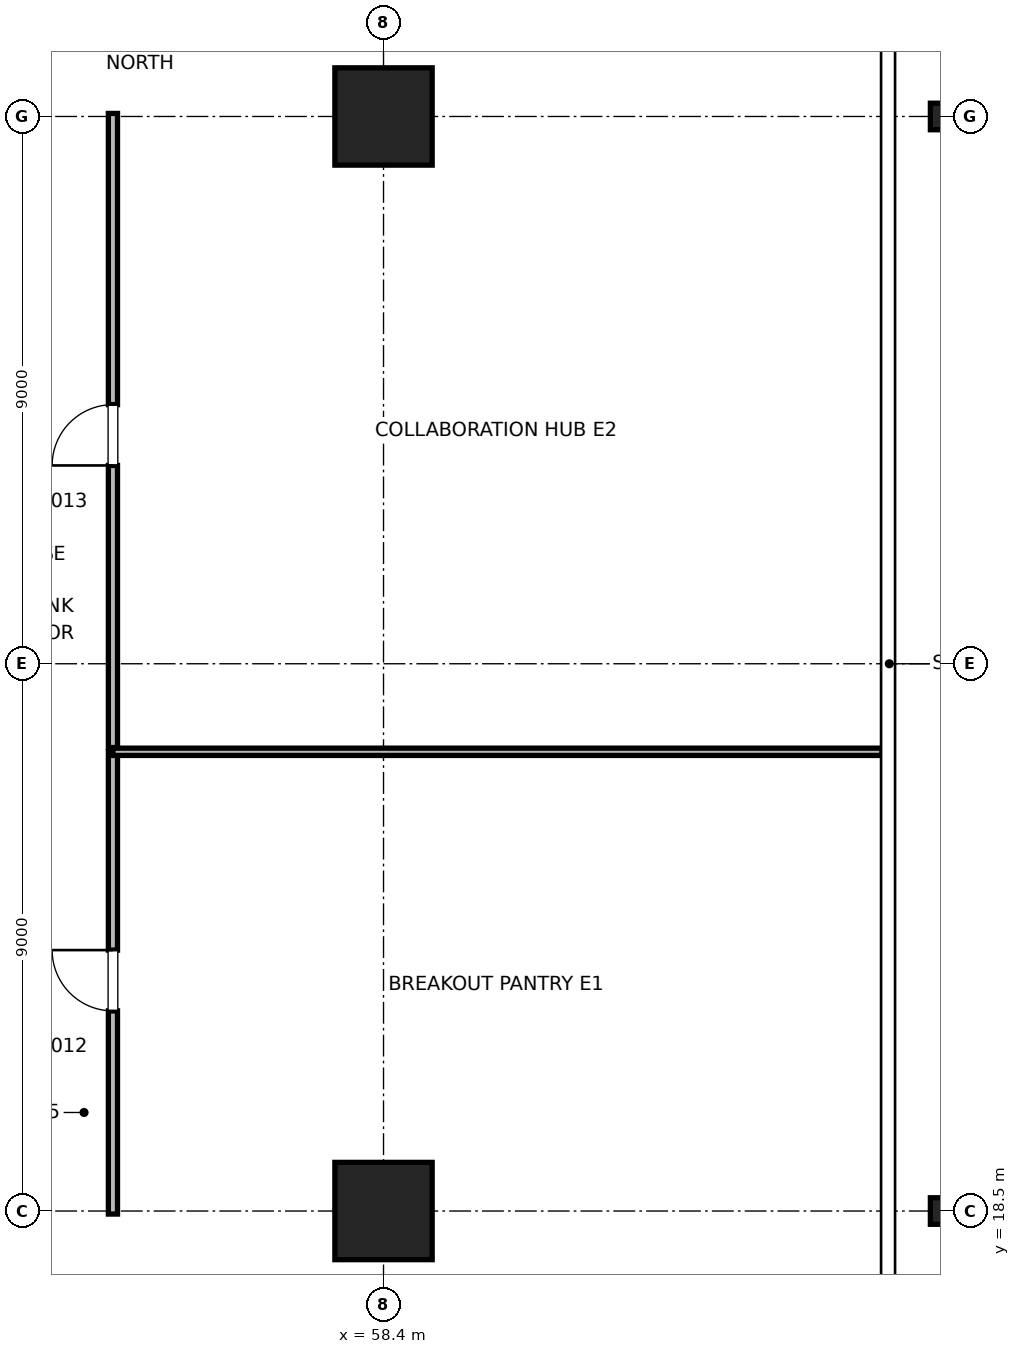
"""IFC4 building model, lengths in metres.
Left out: names, types, materials, properties, quantities, classifications, styles, units other than length and angle.
Written with IfcOpenShell. Run it as: python <this file> out.ifc"""

import sys

from ifc_helpers import new_model, si_unit, direction, frame, frame_2d, origin, origin_2d, place, context, subcontext, project, spatial, rectangle, i_section, extrude, element, fill, save


model = new_model("IFC4")
c1 = context("Model", 3, precision=1e-05, world=origin(), true_north=direction((0.0, 1.0)))
c2 = subcontext(c1, "Body", "Model", "MODEL_VIEW")
j1 = project(units=[si_unit("LENGTHUNIT", "METRE"), si_unit("PLANEANGLEUNIT", "RADIAN")], contexts=[c1])
p1 = place(None, origin())
s1 = spatial("IfcSite", under=j1, at=p1, CompositionType="ELEMENT")
p2 = place(p1, origin())
s2 = spatial("IfcBuilding", under=s1, at=p2, CompositionType="ELEMENT")
p3 = place(p2, frame((0.0, 0.0, 164.4)))
s3 = spatial("IfcBuildingStorey", under=s2, at=p3, CompositionType="ELEMENT", Elevation=164.4)
for number, where, z_axis, x_axis in (
    (1, (58.4, 18.5, 0.0), (0.0, 0.0, 1.0), (1.0, 0.0, 0.0)),
    (2, (58.4, 36.5, 0.0), (0.0, 0.0, 1.0), (1.0, 0.0, 0.0)),
):
    element("IfcColumn", number, at=place(p3, frame(where, z_axis=z_axis, x_axis=x_axis)), inside=s3, PredefinedType="COLUMN", context=c2, shape_type="SweptSolid", body=[
        extrude(rectangle(XDim=1.6, YDim=1.6, at=origin_2d()), origin(), (0.0, 0.0, 1.0), 4.0),
    ])
for number, where, z_axis, x_axis in (
    (3, (67.6, 18.5, 0.0), (0.0, 0.0, 1.0), (1.0, 0.0, 0.0)),
    (4, (67.6, 36.5, 0.0), (0.0, 0.0, 1.0), (1.0, 0.0, 0.0)),
):
    element("IfcColumn", number, at=place(p3, frame(where, z_axis=z_axis, x_axis=x_axis)), inside=s3, PredefinedType="COLUMN", context=c2, shape_type="SweptSolid", body=[
        extrude(i_section(OverallWidth=0.412, OverallDepth=0.437, WebThickness=0.036, FlangeThickness=0.058, FilletRadius=0.015, at=origin_2d()), origin(), (0.0, 0.0, 1.0), 4.0),
    ])
p4 = place(p3, frame((53.95, 18.45, 0.0), z_axis=(0.0, 0.0, 1.0), x_axis=(0.0, 1.0, 0.0)))
e5 = element("IfcWall", 5, at=p4, inside=s3, PredefinedType="PARTITIONING", context=c2, shape_type="SweptSolid", body=[
    extrude(rectangle(XDim=7.602, YDim=0.15, at=frame_2d((3.801, 0.0))), origin(), (0.0, 0.0, 1.0), 2.85),
])
p5 = place(p4, frame((3.341, 0.0, 0.0)))
e6 = element("IfcOpeningElement", 6, at=p5, cuts=e5, PredefinedType="OPENING", context=c2, shape_type="SweptSolid", body=[
    extrude(rectangle(XDim=1.0, YDim=2.15, at=frame_2d((0.5, 1.075))), frame((0.0, 0.075, 0.0), z_axis=(0.0, -1.0, 0.0), x_axis=(1.0, 0.0, 0.0)), (0.0, 0.0, 1.0), 0.15),
])
p6 = place(p3, frame((53.95, 26.052, 0.0), z_axis=(0.0, 0.0, 1.0), x_axis=(1.0, 0.0, 0.0)))
e7 = element("IfcWall", 7, at=p6, inside=s3, PredefinedType="PARTITIONING", context=c2, shape_type="SweptSolid", body=[
    extrude(rectangle(XDim=12.648, YDim=0.12, at=frame_2d((6.324, 0.0))), origin(), (0.0, 0.0, 1.0), 2.85),
])
p7 = place(p3, frame((53.95, 26.122, 0.0), z_axis=(0.0, 0.0, 1.0), x_axis=(0.0, 1.0, 0.0)))
e8 = element("IfcWall", 8, at=p7, inside=s3, PredefinedType="PARTITIONING", context=c2, shape_type="SweptSolid", body=[
    extrude(rectangle(XDim=10.428, YDim=0.15, at=frame_2d((5.214, 0.0))), origin(), (0.0, 0.0, 1.0), 2.85),
])
p8 = place(p7, frame((4.639, 0.0, 0.0)))
e9 = element("IfcOpeningElement", 9, at=p8, cuts=e8, PredefinedType="OPENING", context=c2, shape_type="SweptSolid", body=[
    extrude(rectangle(XDim=1.0, YDim=2.15, at=frame_2d((0.5, 1.075))), frame((0.0, 0.075, 0.0), z_axis=(0.0, -1.0, 0.0), x_axis=(1.0, 0.0, 0.0)), (0.0, 0.0, 1.0), 0.15),
])
p9 = place(p5, origin())
e10 = element("IfcDoor", 10, at=p9, inside=s3, OperationType="SINGLE_SWING_RIGHT", PredefinedType="DOOR", context=c2, shape_type="SweptSolid", body=[
    extrude(rectangle(XDim=1.0, YDim=2.15, at=frame_2d((0.5, 1.075))), frame((0.0, 0.025, 0.0), z_axis=(0.0, -1.0, 0.0), x_axis=(1.0, 0.0, 0.0)), (0.0, 0.0, 1.0), 0.05),
])
fill(e6, e10)
p10 = place(p8, origin())
e11 = element("IfcDoor", 11, at=p10, inside=s3, OperationType="SINGLE_SWING_LEFT", PredefinedType="DOOR", context=c2, shape_type="SweptSolid", body=[
    extrude(rectangle(XDim=1.0, YDim=2.15, at=frame_2d((0.5, 1.075))), frame((0.0, 0.025, 0.0), z_axis=(0.0, -1.0, 0.0), x_axis=(1.0, 0.0, 0.0)), (0.0, 0.0, 1.0), 0.05),
])
fill(e9, e11)
save(model, sys.argv[1])
